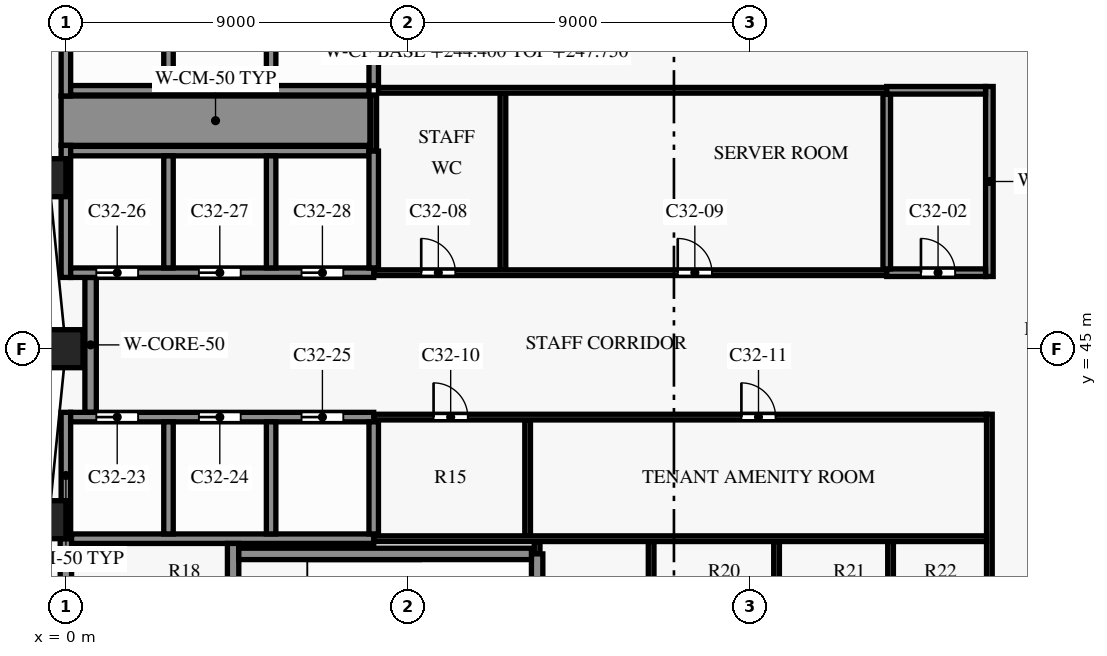
"""IFC4 building model, lengths in metres.
Left out: names, types, materials, properties, quantities, classifications, styles, units other than length and angle.
Written with IfcOpenShell. Run it as: python <this file> out.ifc"""

import sys

from ifc_helpers import new_model, si_unit, direction, frame, frame_2d, origin, origin_2d, place, context, subcontext, project, spatial, rectangle, extrude, element, fill, save


model = new_model("IFC4")
c1 = context("Model", 3, precision=1e-05, world=origin(), true_north=direction((0.0, 1.0)))
c2 = subcontext(c1, "Body", "Model", "MODEL_VIEW")
j1 = project(units=[si_unit("LENGTHUNIT", "METRE"), si_unit("PLANEANGLEUNIT", "RADIAN")], contexts=[c1])
p1 = place(None, origin())
s1 = spatial("IfcSite", under=j1, at=p1, CompositionType="ELEMENT")
p2 = place(p1, origin())
s2 = spatial("IfcBuilding", under=s1, at=p2, CompositionType="ELEMENT")
p3 = place(p2, frame((0.0, 0.0, 244.4)))
s3 = spatial("IfcBuildingStorey", under=s2, at=p3, CompositionType="ELEMENT", Elevation=244.4)
for number, where, z_axis, x_axis in (
    (1, (-0.45, 49.5, 0.0), (0.0, 0.0, 1.0), (0.1, -0.995, 0.0)),
    (2, (0.0, 45.0, 0.0), (0.0, 0.0, 1.0), (0.0, -1.0, 0.0)),
    (3, (-0.45, 40.5, 0.0), (0.0, 0.0, 1.0), (-0.1, -0.995, 0.0)),
):
    element("IfcColumn", number, at=place(p3, frame(where, z_axis=z_axis, x_axis=x_axis)), inside=s3, PredefinedType="COLUMN", context=c2, shape_type="SweptSolid", body=[
        extrude(rectangle(XDim=0.9, YDim=1.0, at=origin_2d()), origin(), (0.0, 0.0, 1.0), 3.8),
    ])
p4 = place(p3, frame((4.55, 39.6, 0.0), z_axis=(0.0, 0.0, 1.0), x_axis=(1.0, 0.0, 0.0)))
e4 = element("IfcWall", 4, at=p4, inside=s3, PredefinedType="SHEAR", context=c2, shape_type="SweptSolid", body=[
    extrude(rectangle(XDim=7.7, YDim=0.3, at=frame_2d((3.85, 0.0))), origin(), (0.0, 0.0, 1.0), 3.5),
])
p5 = place(p3, frame((8.1, 40.0, 0.0), z_axis=(0.0, 0.0, 1.0), x_axis=(1.0, 0.0, 0.0)))
e5 = element("IfcWall", 5, at=p5, inside=s3, PredefinedType="PARTITIONING", context=c2, shape_type="SweptSolid", body=[
    extrude(rectangle(XDim=16.125, YDim=0.15, at=frame_2d((8.062, 0.0))), origin(), (0.0, 0.0, 1.0), 3.35),
])
p6 = place(p3, frame((0.15, 40.0, 0.0), z_axis=(0.0, 0.0, 1.0), x_axis=(1.0, 0.0, 0.0)))
e6 = element("IfcWall", 6, at=p6, inside=s3, PredefinedType="SHEAR", context=c2, shape_type="SweptSolid", body=[
    extrude(rectangle(XDim=7.95, YDim=0.25, at=frame_2d((3.975, 0.0))), origin(), (0.0, 0.0, 1.0), 3.5),
])
p7 = place(p3, frame((8.1, 43.2, 0.0), z_axis=(0.0, 0.0, 1.0), x_axis=(1.0, 0.0, 0.0)))
e7 = element("IfcWall", 7, at=p7, inside=s3, PredefinedType="PARTITIONING", context=c2, shape_type="SweptSolid", body=[
    extrude(rectangle(XDim=16.125, YDim=0.15, at=frame_2d((8.062, 0.0))), origin(), (0.0, 0.0, 1.0), 3.35),
])
p8 = place(p7, frame((1.575, 0.0, 0.0)))
e8 = element("IfcOpeningElement", 8, at=p8, cuts=e7, PredefinedType="OPENING", context=c2, shape_type="SweptSolid", body=[
    extrude(rectangle(XDim=0.9, YDim=2.1, at=frame_2d((0.45, 1.05))), frame((0.0, 0.085, 0.0), z_axis=(0.0, -1.0, 0.0), x_axis=(1.0, 0.0, 0.0)), (0.0, 0.0, 1.0), 0.17),
])
p9 = place(p7, frame((9.675, 0.0, 0.0)))
e9 = element("IfcOpeningElement", 9, at=p9, cuts=e7, PredefinedType="OPENING", context=c2, shape_type="SweptSolid", body=[
    extrude(rectangle(XDim=0.9, YDim=2.1, at=frame_2d((0.45, 1.05))), frame((0.0, 0.085, 0.0), z_axis=(0.0, -1.0, 0.0), x_axis=(1.0, 0.0, 0.0)), (0.0, 0.0, 1.0), 0.17),
])
p10 = place(p3, frame((0.125, 43.2, 0.0), z_axis=(0.0, 0.0, 1.0), x_axis=(1.0, 0.0, 0.0)))
e10 = element("IfcWall", 10, at=p10, inside=s3, PredefinedType="SHEAR", context=c2, shape_type="SweptSolid", body=[
    extrude(rectangle(XDim=7.975, YDim=0.25, at=frame_2d((3.988, 0.0))), origin(), (0.0, 0.0, 1.0), 3.5),
])
p11 = place(p10, frame((0.675, 0.0, 0.0)))
e11 = element("IfcOpeningElement", 11, at=p11, cuts=e10, PredefinedType="OPENING", context=c2, shape_type="SweptSolid", body=[
    extrude(rectangle(XDim=1.1, YDim=2.1, at=frame_2d((0.55, 1.05))), frame((0.0, 0.135, 0.0), z_axis=(0.0, -1.0, 0.0), x_axis=(1.0, 0.0, 0.0)), (0.0, 0.0, 1.0), 0.27),
])
p12 = place(p10, frame((3.375, 0.0, 0.0)))
e12 = element("IfcOpeningElement", 12, at=p12, cuts=e10, PredefinedType="OPENING", context=c2, shape_type="SweptSolid", body=[
    extrude(rectangle(XDim=1.1, YDim=2.1, at=frame_2d((0.55, 1.05))), frame((0.0, 0.135, 0.0), z_axis=(0.0, -1.0, 0.0), x_axis=(1.0, 0.0, 0.0)), (0.0, 0.0, 1.0), 0.27),
])
p13 = place(p10, frame((6.075, 0.0, 0.0)))
e13 = element("IfcOpeningElement", 13, at=p13, cuts=e10, PredefinedType="OPENING", context=c2, shape_type="SweptSolid", body=[
    extrude(rectangle(XDim=1.1, YDim=2.1, at=frame_2d((0.55, 1.05))), frame((0.0, 0.135, 0.0), z_axis=(0.0, -1.0, 0.0), x_axis=(1.0, 0.0, 0.0)), (0.0, 0.0, 1.0), 0.27),
])
p14 = place(p3, frame((8.1, 47.0, 0.0), z_axis=(0.0, 0.0, 1.0), x_axis=(1.0, 0.0, 0.0)))
e14 = element("IfcWall", 14, at=p14, inside=s3, PredefinedType="PARTITIONING", context=c2, shape_type="SweptSolid", body=[
    extrude(rectangle(XDim=13.5, YDim=0.15, at=frame_2d((6.75, 0.0))), origin(), (0.0, 0.0, 1.0), 3.35),
])
p15 = place(p14, frame((1.25, 0.0, 0.0)))
e15 = element("IfcOpeningElement", 15, at=p15, cuts=e14, PredefinedType="OPENING", context=c2, shape_type="SweptSolid", body=[
    extrude(rectangle(XDim=0.9, YDim=2.1, at=frame_2d((0.45, 1.05))), frame((0.0, 0.085, 0.0), z_axis=(0.0, -1.0, 0.0), x_axis=(1.0, 0.0, 0.0)), (0.0, 0.0, 1.0), 0.17),
])
p16 = place(p14, frame((8.0, 0.0, 0.0)))
e16 = element("IfcOpeningElement", 16, at=p16, cuts=e14, PredefinedType="OPENING", context=c2, shape_type="SweptSolid", body=[
    extrude(rectangle(XDim=0.9, YDim=2.1, at=frame_2d((0.45, 1.05))), frame((0.0, 0.085, 0.0), z_axis=(0.0, -1.0, 0.0), x_axis=(1.0, 0.0, 0.0)), (0.0, 0.0, 1.0), 0.17),
])
p17 = place(p3, frame((21.6, 47.0, 0.0), z_axis=(0.0, 0.0, 1.0), x_axis=(1.0, 0.0, 0.0)))
e17 = element("IfcWall", 17, at=p17, inside=s3, PredefinedType="PARTITIONING", context=c2, shape_type="SweptSolid", body=[
    extrude(rectangle(XDim=2.6, YDim=0.2, at=frame_2d((1.3, 0.0))), origin(), (0.0, 0.0, 1.0), 3.35),
])
p18 = place(p17, frame((0.9, 0.0, 0.0)))
e18 = element("IfcOpeningElement", 18, at=p18, cuts=e17, PredefinedType="OPENING", context=c2, shape_type="SweptSolid", body=[
    extrude(rectangle(XDim=0.9, YDim=2.1, at=frame_2d((0.45, 1.05))), frame((0.0, 0.11, 0.0), z_axis=(0.0, -1.0, 0.0), x_axis=(1.0, 0.0, 0.0)), (0.0, 0.0, 1.0), 0.22),
])
p19 = place(p3, frame((0.125, 47.0, 0.0), z_axis=(0.0, 0.0, 1.0), x_axis=(1.0, 0.0, 0.0)))
e19 = element("IfcWall", 19, at=p19, inside=s3, PredefinedType="SHEAR", context=c2, shape_type="SweptSolid", body=[
    extrude(rectangle(XDim=7.975, YDim=0.25, at=frame_2d((3.988, 0.0))), origin(), (0.0, 0.0, 1.0), 3.5),
])
p20 = place(p19, frame((0.675, 0.0, 0.0)))
e20 = element("IfcOpeningElement", 20, at=p20, cuts=e19, PredefinedType="OPENING", context=c2, shape_type="SweptSolid", body=[
    extrude(rectangle(XDim=1.1, YDim=2.1, at=frame_2d((0.55, 1.05))), frame((0.0, 0.135, 0.0), z_axis=(0.0, -1.0, 0.0), x_axis=(1.0, 0.0, 0.0)), (0.0, 0.0, 1.0), 0.27),
])
p21 = place(p19, frame((3.375, 0.0, 0.0)))
e21 = element("IfcOpeningElement", 21, at=p21, cuts=e19, PredefinedType="OPENING", context=c2, shape_type="SweptSolid", body=[
    extrude(rectangle(XDim=1.1, YDim=2.1, at=frame_2d((0.55, 1.05))), frame((0.0, 0.135, 0.0), z_axis=(0.0, -1.0, 0.0), x_axis=(1.0, 0.0, 0.0)), (0.0, 0.0, 1.0), 0.27),
])
p22 = place(p19, frame((6.075, 0.0, 0.0)))
e22 = element("IfcOpeningElement", 22, at=p22, cuts=e19, PredefinedType="OPENING", context=c2, shape_type="SweptSolid", body=[
    extrude(rectangle(XDim=1.1, YDim=2.1, at=frame_2d((0.55, 1.05))), frame((0.0, 0.135, 0.0), z_axis=(0.0, -1.0, 0.0), x_axis=(1.0, 0.0, 0.0)), (0.0, 0.0, 1.0), 0.27),
])
p23 = place(p3, frame((0.125, 50.2, 0.0), z_axis=(0.0, 0.0, 1.0), x_axis=(1.0, 0.0, 0.0)))
e23 = element("IfcWall", 23, at=p23, inside=s3, PredefinedType="SHEAR", context=c2, shape_type="SweptSolid", body=[
    extrude(rectangle(XDim=7.85, YDim=0.25, at=frame_2d((3.925, 0.0))), origin(), (0.0, 0.0, 1.0), 3.5),
])
p24 = place(p3, frame((-0.125, 51.0, 0.0), z_axis=(0.0, 0.0, 1.0), x_axis=(1.0, 0.0, 0.0)))
e24 = element("IfcWall", 24, at=p24, inside=s3, PredefinedType="SHEAR", context=c2, shape_type="SweptSolid", body=[
    extrude(rectangle(XDim=8.125, YDim=1.3, at=frame_2d((4.062, 0.0))), origin(), (0.0, 0.0, 1.0), 3.5),
])
p25 = place(p3, frame((8.225, 51.8, 0.0), z_axis=(0.0, 0.0, 1.0), x_axis=(1.0, 0.0, 0.0)))
e25 = element("IfcWall", 25, at=p25, inside=s3, PredefinedType="PARTITIONING", context=c2, shape_type="SweptSolid", body=[
    extrude(rectangle(XDim=13.375, YDim=0.15, at=frame_2d((6.688, 0.0))), origin(), (0.0, 0.0, 1.0), 3.35),
])
p26 = place(p3, frame((21.6, 51.8, 0.0), z_axis=(0.0, 0.0, 1.0), x_axis=(1.0, 0.0, 0.0)))
e26 = element("IfcWall", 26, at=p26, inside=s3, PredefinedType="PARTITIONING", context=c2, shape_type="SweptSolid", body=[
    extrude(rectangle(XDim=2.6, YDim=0.2, at=frame_2d((1.3, 0.0))), origin(), (0.0, 0.0, 1.0), 3.35),
])
p27 = place(p3, frame((0.125, 51.8, 0.0), z_axis=(0.0, 0.0, 1.0), x_axis=(1.0, 0.0, 0.0)))
e27 = element("IfcWall", 27, at=p27, inside=s3, PredefinedType="SHEAR", context=c2, shape_type="SweptSolid", body=[
    extrude(rectangle(XDim=7.85, YDim=0.25, at=frame_2d((3.925, 0.0))), origin(), (0.0, 0.0, 1.0), 3.5),
])
p28 = place(p3, frame((0.0, 35.925, 0.0), z_axis=(0.0, 0.0, 1.0), x_axis=(0.0, 1.0, 0.0)))
e28 = element("IfcWall", 28, at=p28, inside=s3, PredefinedType="SHEAR", context=c2, shape_type="SweptSolid", body=[
    extrude(rectangle(XDim=4.075, YDim=0.3, at=frame_2d((2.038, 0.0))), origin(), (0.0, 0.0, 1.0), 3.5),
])
p29 = place(p3, frame((0.0, 40.0, 0.0), z_axis=(0.0, 0.0, 1.0), x_axis=(0.0, 1.0, 0.0)))
e29 = element("IfcWall", 29, at=p29, inside=s3, PredefinedType="SHEAR", context=c2, shape_type="SweptSolid", body=[
    extrude(rectangle(XDim=3.325, YDim=0.25, at=frame_2d((1.663, 0.0))), origin(), (0.0, 0.0, 1.0), 3.5),
])
p30 = place(p3, frame((0.0, 46.875, 0.0), z_axis=(0.0, 0.0, 1.0), x_axis=(0.0, 1.0, 0.0)))
e30 = element("IfcWall", 30, at=p30, inside=s3, PredefinedType="SHEAR", context=c2, shape_type="SweptSolid", body=[
    extrude(rectangle(XDim=3.475, YDim=0.25, at=frame_2d((1.738, 0.0))), origin(), (0.0, 0.0, 1.0), 3.5),
])
p31 = place(p3, frame((0.0, 51.65, 0.0), z_axis=(0.0, 0.0, 1.0), x_axis=(0.0, 1.0, 0.0)))
e31 = element("IfcWall", 31, at=p31, inside=s3, PredefinedType="SHEAR", context=c2, shape_type="SweptSolid", body=[
    extrude(rectangle(XDim=3.35, YDim=0.25, at=frame_2d((1.675, 0.0))), origin(), (0.0, 0.0, 1.0), 3.5),
])
p32 = place(p3, frame((0.65, 43.325, 0.0), z_axis=(0.0, 0.0, 1.0), x_axis=(0.0, 1.0, 0.0)))
e32 = element("IfcWall", 32, at=p32, inside=s3, PredefinedType="SHEAR", context=c2, shape_type="SweptSolid", body=[
    extrude(rectangle(XDim=3.55, YDim=0.3, at=frame_2d((1.775, 0.0))), origin(), (0.0, 0.0, 1.0), 3.5),
])
for number, where, z_axis, x_axis in (
    (33, (2.7, 40.125, 0.0), (0.0, 0.0, 1.0), (0.0, 1.0, 0.0)),
    (34, (2.7, 47.125, 0.0), (0.0, 0.0, 1.0), (0.0, 1.0, 0.0)),
    (35, (2.7, 51.925, 0.0), (0.0, 0.0, 1.0), (0.0, 1.0, 0.0)),
):
    element("IfcWall", number, at=place(p3, frame(where, z_axis=z_axis, x_axis=x_axis)), inside=s3, PredefinedType="SHEAR", context=c2, shape_type="SweptSolid", body=[
        extrude(rectangle(XDim=2.95, YDim=0.25, at=frame_2d((1.475, 0.0))), origin(), (0.0, 0.0, 1.0), 3.5),
    ])
p33 = place(p3, frame((4.4, 36.15, 0.0), z_axis=(0.0, 0.0, 1.0), x_axis=(0.0, 1.0, 0.0)))
e36 = element("IfcWall", 36, at=p33, inside=s3, PredefinedType="SHEAR", context=c2, shape_type="SweptSolid", body=[
    extrude(rectangle(XDim=3.725, YDim=0.3, at=frame_2d((1.863, 0.0))), origin(), (0.0, 0.0, 1.0), 3.5),
])
for number, where, z_axis, x_axis in (
    (37, (5.4, 40.125, 0.0), (0.0, 0.0, 1.0), (0.0, 1.0, 0.0)),
    (38, (5.4, 47.125, 0.0), (0.0, 0.0, 1.0), (0.0, 1.0, 0.0)),
    (39, (5.4, 51.925, 0.0), (0.0, 0.0, 1.0), (0.0, 1.0, 0.0)),
):
    element("IfcWall", number, at=place(p3, frame(where, z_axis=z_axis, x_axis=x_axis)), inside=s3, PredefinedType="SHEAR", context=c2, shape_type="SweptSolid", body=[
        extrude(rectangle(XDim=2.95, YDim=0.25, at=frame_2d((1.475, 0.0))), origin(), (0.0, 0.0, 1.0), 3.5),
    ])
p34 = place(p3, frame((8.1, 50.2, 0.0), z_axis=(0.0, 0.0, 1.0), x_axis=(0.0, 1.0, 0.0)))
e40 = element("IfcWall", 40, at=p34, inside=s3, PredefinedType="PARTITIONING", context=c2, shape_type="SweptSolid", body=[
    extrude(rectangle(XDim=1.475, YDim=0.15, at=frame_2d((0.738, 0.0))), origin(), (0.0, 0.0, 1.0), 3.35),
])
p35 = place(p3, frame((8.1, 40.125, 0.0), z_axis=(0.0, 0.0, 1.0), x_axis=(0.0, 1.0, 0.0)))
e41 = element("IfcWall", 41, at=p35, inside=s3, PredefinedType="SHEAR", context=c2, shape_type="SweptSolid", body=[
    extrude(rectangle(XDim=2.95, YDim=0.25, at=frame_2d((1.475, 0.0))), origin(), (0.0, 0.0, 1.0), 3.5),
])
p36 = place(p3, frame((8.1, 47.125, 0.0), z_axis=(0.0, 0.0, 1.0), x_axis=(0.0, 1.0, 0.0)))
e42 = element("IfcWall", 42, at=p36, inside=s3, PredefinedType="SHEAR", context=c2, shape_type="SweptSolid", body=[
    extrude(rectangle(XDim=3.075, YDim=0.25, at=frame_2d((1.538, 0.0))), origin(), (0.0, 0.0, 1.0), 3.5),
])
p37 = place(p3, frame((8.1, 51.925, 0.0), z_axis=(0.0, 0.0, 1.0), x_axis=(0.0, 1.0, 0.0)))
e43 = element("IfcWall", 43, at=p37, inside=s3, PredefinedType="SHEAR", context=c2, shape_type="SweptSolid", body=[
    extrude(rectangle(XDim=2.95, YDim=0.25, at=frame_2d((1.475, 0.0))), origin(), (0.0, 0.0, 1.0), 3.5),
])
p38 = place(p3, frame((11.5, 47.075, 0.0), z_axis=(0.0, 0.0, 1.0), x_axis=(0.0, 1.0, 0.0)))
e44 = element("IfcWall", 44, at=p38, inside=s3, PredefinedType="PARTITIONING", context=c2, shape_type="SweptSolid", body=[
    extrude(rectangle(XDim=4.65, YDim=0.15, at=frame_2d((2.325, 0.0))), origin(), (0.0, 0.0, 1.0), 3.35),
])
p39 = place(p3, frame((12.15, 40.075, 0.0), z_axis=(0.0, 0.0, 1.0), x_axis=(0.0, 1.0, 0.0)))
e45 = element("IfcWall", 45, at=p39, inside=s3, PredefinedType="PARTITIONING", context=c2, shape_type="SweptSolid", body=[
    extrude(rectangle(XDim=3.05, YDim=0.15, at=frame_2d((1.525, 0.0))), origin(), (0.0, 0.0, 1.0), 3.35),
])
p40 = place(p3, frame((12.4, 39.6, 0.0), z_axis=(0.0, 0.0, 1.0), x_axis=(0.0, 1.0, 0.0)))
e46 = element("IfcWall", 46, at=p40, inside=s3, PredefinedType="PARTITIONING", context=c2, shape_type="SweptSolid", body=[
    extrude(rectangle(XDim=0.325, YDim=0.15, at=frame_2d((0.163, 0.0))), origin(), (0.0, 0.0, 1.0), 3.35),
])
p41 = place(p3, frame((12.4, 36.15, 0.0), z_axis=(0.0, 0.0, 1.0), x_axis=(0.0, 1.0, 0.0)))
e47 = element("IfcWall", 47, at=p41, inside=s3, PredefinedType="SHEAR", context=c2, shape_type="SweptSolid", body=[
    extrude(rectangle(XDim=3.45, YDim=0.3, at=frame_2d((1.725, 0.0))), origin(), (0.0, 0.0, 1.0), 3.5),
])
for number, where, z_axis, x_axis in (
    (48, (15.4, 36.075, 0.0), (0.0, 0.0, 1.0), (0.0, 1.0, 0.0)),
    (49, (18.7, 36.075, 0.0), (0.0, 0.0, 1.0), (0.0, 1.0, 0.0)),
):
    element("IfcWall", number, at=place(p3, frame(where, z_axis=z_axis, x_axis=x_axis)), inside=s3, PredefinedType="PARTITIONING", context=c2, shape_type="SweptSolid", body=[
        extrude(rectangle(XDim=3.85, YDim=0.15, at=frame_2d((1.925, 0.0))), origin(), (0.0, 0.0, 1.0), 3.35),
    ])
p42 = place(p3, frame((21.6, 47.1, 0.0), z_axis=(0.0, 0.0, 1.0), x_axis=(0.0, 1.0, 0.0)))
e50 = element("IfcWall", 50, at=p42, inside=s3, PredefinedType="PARTITIONING", context=c2, shape_type="SweptSolid", body=[
    extrude(rectangle(XDim=4.6, YDim=0.2, at=frame_2d((2.3, 0.0))), origin(), (0.0, 0.0, 1.0), 3.35),
])
p43 = place(p3, frame((21.7, 36.075, 0.0), z_axis=(0.0, 0.0, 1.0), x_axis=(0.0, 1.0, 0.0)))
e51 = element("IfcWall", 51, at=p43, inside=s3, PredefinedType="PARTITIONING", context=c2, shape_type="SweptSolid", body=[
    extrude(rectangle(XDim=3.85, YDim=0.15, at=frame_2d((1.925, 0.0))), origin(), (0.0, 0.0, 1.0), 3.35),
])
p44 = place(p3, frame((24.3, 35.925, 0.0), z_axis=(0.0, 0.0, 1.0), x_axis=(0.0, 1.0, 0.0)))
e52 = element("IfcWall", 52, at=p44, inside=s3, PredefinedType="PARTITIONING", context=c2, shape_type="SweptSolid", body=[
    extrude(rectangle(XDim=7.35, YDim=0.15, at=frame_2d((3.675, 0.0))), origin(), (0.0, 0.0, 1.0), 3.35),
])
p45 = place(p3, frame((24.3, 46.9, 0.0), z_axis=(0.0, 0.0, 1.0), x_axis=(0.0, 1.0, 0.0)))
e53 = element("IfcWall", 53, at=p45, inside=s3, PredefinedType="SHEAR", context=c2, shape_type="SweptSolid", body=[
    extrude(rectangle(XDim=5.0, YDim=0.2, at=frame_2d((2.5, 0.0))), origin(), (0.0, 0.0, 1.0), 3.5),
])
p46 = place(p18, origin())
e54 = element("IfcDoor", 54, at=p46, inside=s3, OperationType="SINGLE_SWING_LEFT", PredefinedType="DOOR", context=c2, shape_type="SweptSolid", body=[
    extrude(rectangle(XDim=0.9, YDim=2.1, at=frame_2d((0.45, 1.05))), frame((0.0, 0.025, 0.0), z_axis=(0.0, -1.0, 0.0), x_axis=(1.0, 0.0, 0.0)), (0.0, 0.0, 1.0), 0.05),
])
fill(e18, e54)
p47 = place(p15, origin())
e55 = element("IfcDoor", 55, at=p47, inside=s3, OperationType="SINGLE_SWING_LEFT", PredefinedType="DOOR", context=c2, shape_type="SweptSolid", body=[
    extrude(rectangle(XDim=0.9, YDim=2.1, at=frame_2d((0.45, 1.05))), frame((0.0, 0.025, 0.0), z_axis=(0.0, -1.0, 0.0), x_axis=(1.0, 0.0, 0.0)), (0.0, 0.0, 1.0), 0.05),
])
fill(e15, e55)
p48 = place(p16, origin())
e56 = element("IfcDoor", 56, at=p48, inside=s3, OperationType="SINGLE_SWING_RIGHT", PredefinedType="DOOR", context=c2, shape_type="SweptSolid", body=[
    extrude(rectangle(XDim=0.9, YDim=2.1, at=frame_2d((0.45, 1.05))), frame((0.0, 0.025, 0.0), z_axis=(0.0, -1.0, 0.0), x_axis=(1.0, 0.0, 0.0)), (0.0, 0.0, 1.0), 0.05),
])
fill(e16, e56)
p49 = place(p8, origin())
e57 = element("IfcDoor", 57, at=p49, inside=s3, OperationType="SINGLE_SWING_RIGHT", PredefinedType="DOOR", context=c2, shape_type="SweptSolid", body=[
    extrude(rectangle(XDim=0.9, YDim=2.1, at=frame_2d((0.45, 1.05))), frame((0.0, 0.025, 0.0), z_axis=(0.0, -1.0, 0.0), x_axis=(1.0, 0.0, 0.0)), (0.0, 0.0, 1.0), 0.05),
])
fill(e8, e57)
p50 = place(p9, origin())
e58 = element("IfcDoor", 58, at=p50, inside=s3, OperationType="SINGLE_SWING_LEFT", PredefinedType="DOOR", context=c2, shape_type="SweptSolid", body=[
    extrude(rectangle(XDim=0.9, YDim=2.1, at=frame_2d((0.45, 1.05))), frame((0.0, 0.025, 0.0), z_axis=(0.0, -1.0, 0.0), x_axis=(1.0, 0.0, 0.0)), (0.0, 0.0, 1.0), 0.05),
])
fill(e9, e58)
p51 = place(p11, origin())
e59 = element("IfcDoor", 59, at=p51, inside=s3, OperationType="DOUBLE_DOOR_SLIDING", PredefinedType="DOOR", context=c2, shape_type="SweptSolid", body=[
    extrude(rectangle(XDim=1.1, YDim=2.1, at=frame_2d((0.55, 1.05))), frame((0.0, 0.025, 0.0), z_axis=(0.0, -1.0, 0.0), x_axis=(1.0, 0.0, 0.0)), (0.0, 0.0, 1.0), 0.05),
])
fill(e11, e59)
p52 = place(p12, origin())
e60 = element("IfcDoor", 60, at=p52, inside=s3, OperationType="DOUBLE_DOOR_SLIDING", PredefinedType="DOOR", context=c2, shape_type="SweptSolid", body=[
    extrude(rectangle(XDim=1.1, YDim=2.1, at=frame_2d((0.55, 1.05))), frame((0.0, 0.025, 0.0), z_axis=(0.0, -1.0, 0.0), x_axis=(1.0, 0.0, 0.0)), (0.0, 0.0, 1.0), 0.05),
])
fill(e12, e60)
p53 = place(p13, origin())
e61 = element("IfcDoor", 61, at=p53, inside=s3, OperationType="DOUBLE_DOOR_SLIDING", PredefinedType="DOOR", context=c2, shape_type="SweptSolid", body=[
    extrude(rectangle(XDim=1.1, YDim=2.1, at=frame_2d((0.55, 1.05))), frame((0.0, 0.025, 0.0), z_axis=(0.0, -1.0, 0.0), x_axis=(1.0, 0.0, 0.0)), (0.0, 0.0, 1.0), 0.05),
])
fill(e13, e61)
p54 = place(p20, origin())
e62 = element("IfcDoor", 62, at=p54, inside=s3, OperationType="DOUBLE_DOOR_SLIDING", PredefinedType="DOOR", context=c2, shape_type="SweptSolid", body=[
    extrude(rectangle(XDim=1.1, YDim=2.1, at=frame_2d((0.55, 1.05))), frame((0.0, 0.025, 0.0), z_axis=(0.0, -1.0, 0.0), x_axis=(1.0, 0.0, 0.0)), (0.0, 0.0, 1.0), 0.05),
])
fill(e20, e62)
p55 = place(p21, origin())
e63 = element("IfcDoor", 63, at=p55, inside=s3, OperationType="DOUBLE_DOOR_SLIDING", PredefinedType="DOOR", context=c2, shape_type="SweptSolid", body=[
    extrude(rectangle(XDim=1.1, YDim=2.1, at=frame_2d((0.55, 1.05))), frame((0.0, 0.025, 0.0), z_axis=(0.0, -1.0, 0.0), x_axis=(1.0, 0.0, 0.0)), (0.0, 0.0, 1.0), 0.05),
])
fill(e21, e63)
p56 = place(p22, origin())
e64 = element("IfcDoor", 64, at=p56, inside=s3, OperationType="DOUBLE_DOOR_SLIDING", PredefinedType="DOOR", context=c2, shape_type="SweptSolid", body=[
    extrude(rectangle(XDim=1.1, YDim=2.1, at=frame_2d((0.55, 1.05))), frame((0.0, 0.025, 0.0), z_axis=(0.0, -1.0, 0.0), x_axis=(1.0, 0.0, 0.0)), (0.0, 0.0, 1.0), 0.05),
])
fill(e22, e64)
save(model, sys.argv[1])
